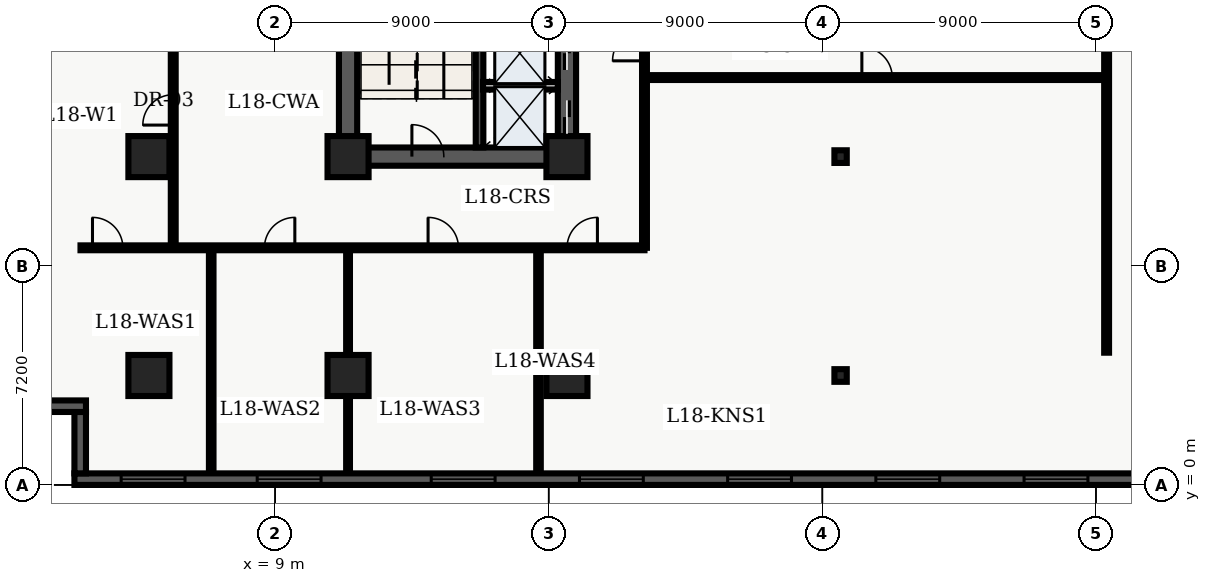
"""IFC4 building model, lengths in metres.
Left out: names, types, materials, properties, quantities, classifications, styles, units other than length and angle.
Written with IfcOpenShell. Run it as: python <this file> out.ifc"""

import sys

from ifc_helpers import new_model, entity, si_unit, converted_unit, direction, frame, origin_with_axes, origin_2d_with_axis, place, context, subcontext, project, spatial, polyline, rectangle, i_section, outline, extrude, element, fill, save


model = new_model("IFC4")
c1 = context("Model", 3, precision=1e-05, world=origin_with_axes(), true_north=direction((0.0, 1.0)))
c2 = subcontext(c1, "Body", "Model", "MODEL_VIEW")
j1 = project(units=[si_unit("LENGTHUNIT", "METRE"), converted_unit("PLANEANGLEUNIT", "DEGREE", entity("IfcPlaneAngleMeasure", 0.017), si_unit("PLANEANGLEUNIT", "RADIAN"), dimensions=[0, 0, 0, 0, 0, 0, 0])], contexts=[c1])
p1 = place(None, origin_with_axes())
s1 = spatial("IfcSite", under=j1, at=p1, CompositionType="ELEMENT")
p2 = place(p1, origin_with_axes())
s2 = spatial("IfcBuilding", under=s1, at=p2, CompositionType="ELEMENT")
p3 = place(p2, frame((0.0, 0.0, 75.6), z_axis=(0.0, 0.0, 1.0), x_axis=(1.0, 0.0, 0.0)))
s3 = spatial("IfcBuildingStorey", under=s2, at=p3, CompositionType="ELEMENT", Elevation=75.6)
p4 = place(p3, frame((11.4, 10.8, 0.0), z_axis=(0.0, 0.0, 1.0), x_axis=(0.0, 1.0, 0.0)))
e1 = element("IfcWall", 1, at=p4, inside=s3, PredefinedType="SHEAR", context=c2, shape_type="SweptSolid", body=[
    extrude(outline(polyline([(0.0, -0.3), (27.0, -0.3), (27.0, 0.3), (0.0, 0.3), (0.0, -0.3)])), origin_with_axes(), (0.0, 0.0, 1.0), 3.6),
])
p5 = place(p3, frame((11.4, 10.8, 0.0), z_axis=(0.0, 0.0, 1.0), x_axis=(1.0, 0.0, 0.0)))
e2 = element("IfcWall", 2, at=p5, inside=s3, PredefinedType="SHEAR", context=c2, shape_type="SweptSolid", body=[
    extrude(outline(polyline([(0.0, -0.3), (7.2, -0.3), (7.2, 0.3), (0.0, 0.3), (0.0, -0.3)])), origin_with_axes(), (0.0, 0.0, 1.0), 3.6),
])
p6 = place(p5, frame((2.625, 0.0, 0.0), z_axis=(0.0, 0.0, 1.0), x_axis=(1.0, 0.0, 0.0)))
e3 = element("IfcOpeningElement", 3, at=p6, cuts=e2, PredefinedType="OPENING", context=c2, shape_type="SweptSolid", body=[
    extrude(rectangle(XDim=1.05, YDim=0.62, at=origin_2d_with_axis()), origin_with_axes(), (0.0, 0.0, 1.0), 2.15),
])
p7 = place(p3, frame((18.6, 10.8, 0.0), z_axis=(0.0, 0.0, 1.0), x_axis=(0.0, 1.0, 0.0)))
e4 = element("IfcWall", 4, at=p7, inside=s3, PredefinedType="SHEAR", context=c2, shape_type="SweptSolid", body=[
    extrude(outline(polyline([(0.0, -0.3), (13.5, -0.3), (13.5, 0.3), (0.0, 0.3), (0.0, -0.3)])), origin_with_axes(), (0.0, 0.0, 1.0), 3.6),
])
p8 = place(p7, frame((1.3, 0.0, 0.0), z_axis=(0.0, 0.0, 1.0), x_axis=(1.0, 0.0, 0.0)))
e5 = element("IfcOpeningElement", 5, at=p8, cuts=e4, PredefinedType="OPENING", context=c2, shape_type="SweptSolid", body=[
    extrude(rectangle(XDim=1.1, YDim=0.62, at=origin_2d_with_axis()), origin_with_axes(), (0.0, 0.0, 1.0), 2.15),
])
p9 = place(p7, frame((3.4, 0.0, 0.0), z_axis=(0.0, 0.0, 1.0), x_axis=(1.0, 0.0, 0.0)))
e6 = element("IfcOpeningElement", 6, at=p9, cuts=e4, PredefinedType="OPENING", context=c2, shape_type="SweptSolid", body=[
    extrude(rectangle(XDim=1.1, YDim=0.62, at=origin_2d_with_axis()), origin_with_axes(), (0.0, 0.0, 1.0), 2.15),
])
p10 = place(p7, frame((11.125, 0.0, 0.0), z_axis=(0.0, 0.0, 1.0), x_axis=(1.0, 0.0, 0.0)))
e7 = element("IfcOpeningElement", 7, at=p10, cuts=e4, PredefinedType="OPENING", context=c2, shape_type="SweptSolid", body=[
    extrude(rectangle(XDim=1.05, YDim=0.62, at=origin_2d_with_axis()), origin_with_axes(), (0.0, 0.0, 1.0), 2.15),
])
p11 = place(p3, frame((15.725, 11.1, 0.0), z_axis=(0.0, 0.0, 1.0), x_axis=(0.0, 1.0, 0.0)))
e8 = element("IfcWall", 8, at=p11, inside=s3, PredefinedType="SHEAR", context=c2, shape_type="SweptSolid", body=[
    extrude(outline(polyline([(0.0, -0.125), (8.6, -0.125), (8.6, 0.125), (0.0, 0.125), (0.0, -0.125)])), origin_with_axes(), (0.0, 0.0, 1.0), 3.6),
])
for number, where, z_axis, x_axis in (
    (9, (11.4, 3.6, 0.0), (0.0, 0.0, 1.0), (1.0, 0.0, 0.0)),
    (10, (11.4, 10.8, 0.0), (0.0, 0.0, 1.0), (1.0, 0.0, 0.0)),
    (11, (18.6, 3.6, 0.0), (0.0, 0.0, 1.0), (1.0, 0.0, 0.0)),
    (12, (18.6, 10.8, 0.0), (0.0, 0.0, 1.0), (1.0, 0.0, 0.0)),
    (13, (4.85, 3.6, 0.0), (0.0, 0.0, 1.0), (1.0, 0.0, 0.0)),
    (14, (4.85, 10.8, 0.0), (0.0, 0.0, 1.0), (1.0, 0.0, 0.0)),
):
    element("IfcColumn", number, at=place(p3, frame(where, z_axis=z_axis, x_axis=x_axis)), inside=s3, PredefinedType="COLUMN", context=c2, shape_type="SweptSolid", body=[
        extrude(rectangle(XDim=1.35, YDim=1.35, at=origin_2d_with_axis()), origin_with_axes(), (0.0, 0.0, 1.0), 3.9),
    ])
for number, where, z_axis, x_axis in (
    (15, (27.6, 3.6, 0.0), (0.0, 0.0, 1.0), (1.0, 0.0, 0.0)),
    (16, (27.6, 10.8, 0.0), (0.0, 0.0, 1.0), (1.0, 0.0, 0.0)),
):
    element("IfcColumn", number, at=place(p3, frame(where, z_axis=z_axis, x_axis=x_axis)), inside=s3, PredefinedType="COLUMN", context=c2, shape_type="SweptSolid", body=[
        extrude(i_section(OverallWidth=0.406, OverallDepth=0.416, WebThickness=0.03, FlangeThickness=0.048, FilletRadius=0.022, at=origin_2d_with_axis()), origin_with_axes(), (0.0, 0.0, 1.0), 3.9),
    ])
p12 = place(p3, frame((15.84, 13.13, 0.0), z_axis=(0.0, 0.0, 1.0), x_axis=(1.0, 0.0, 0.0)))
e17 = element("IfcWall", 17, at=p12, inside=s3, PredefinedType="SOLIDWALL", context=c2, shape_type="SweptSolid", body=[
    extrude(outline(polyline([(0.0, -0.125), (2.46, -0.125), (2.46, 0.125), (0.0, 0.125), (0.0, -0.125)])), origin_with_axes(), (0.0, 0.0, 1.0), 2.64),
])
p13 = place(p3, frame((2.6, 7.8, 0.0), z_axis=(0.0, 0.0, 1.0), x_axis=(1.0, 0.0, 0.0)))
e18 = element("IfcWall", 18, at=p13, inside=s3, PredefinedType="PARTITIONING", context=c2, shape_type="SweptSolid", body=[
    extrude(outline(polyline([(0.0, -0.08), (18.55, -0.08), (18.55, 0.08), (0.0, 0.08), (0.0, -0.08)])), origin_with_axes(), (0.0, 0.0, 1.0), 2.64),
])
p14 = place(p13, frame((0.894, 0.0, 0.0), z_axis=(0.0, 0.0, 1.0), x_axis=(1.0, 0.0, 0.0)))
e19 = element("IfcOpeningElement", 19, at=p14, cuts=e18, PredefinedType="OPENING", context=c2, shape_type="SweptSolid", body=[
    extrude(rectangle(XDim=1.0, YDim=0.18, at=origin_2d_with_axis()), origin_with_axes(), (0.0, 0.0, 1.0), 2.15),
])
p15 = place(p13, frame((6.55, 0.0, 0.0), z_axis=(0.0, 0.0, 1.0), x_axis=(1.0, 0.0, 0.0)))
e20 = element("IfcOpeningElement", 20, at=p15, cuts=e18, PredefinedType="OPENING", context=c2, shape_type="SweptSolid", body=[
    extrude(rectangle(XDim=1.0, YDim=0.18, at=origin_2d_with_axis()), origin_with_axes(), (0.0, 0.0, 1.0), 2.15),
])
p16 = place(p13, frame((11.932, 0.0, 0.0), z_axis=(0.0, 0.0, 1.0), x_axis=(1.0, 0.0, 0.0)))
e21 = element("IfcOpeningElement", 21, at=p16, cuts=e18, PredefinedType="OPENING", context=c2, shape_type="SweptSolid", body=[
    extrude(rectangle(XDim=1.0, YDim=0.18, at=origin_2d_with_axis()), origin_with_axes(), (0.0, 0.0, 1.0), 2.15),
])
p17 = place(p13, frame((16.502, 0.0, 0.0), z_axis=(0.0, 0.0, 1.0), x_axis=(1.0, 0.0, 0.0)))
e22 = element("IfcOpeningElement", 22, at=p17, cuts=e18, PredefinedType="OPENING", context=c2, shape_type="SweptSolid", body=[
    extrude(rectangle(XDim=1.0, YDim=0.18, at=origin_2d_with_axis()), origin_with_axes(), (0.0, 0.0, 1.0), 2.15),
])
p18 = place(p3, frame((21.15, 7.8, 0.0), z_axis=(0.0, 0.0, 1.0), x_axis=(0.0, 1.0, 0.0)))
e23 = element("IfcWall", 23, at=p18, inside=s3, PredefinedType="PARTITIONING", context=c2, shape_type="SweptSolid", body=[
    extrude(outline(polyline([(0.0, -0.08), (32.7, -0.08), (32.7, 0.08), (0.0, 0.08), (0.0, -0.08)])), origin_with_axes(), (0.0, 0.0, 1.0), 2.64),
])
p19 = place(p18, frame((6.675, 0.0, 0.0), z_axis=(0.0, 0.0, 1.0), x_axis=(1.0, 0.0, 0.0)))
e24 = element("IfcOpeningElement", 24, at=p19, cuts=e23, PredefinedType="OPENING", context=c2, shape_type="SweptSolid", body=[
    extrude(rectangle(XDim=1.05, YDim=0.18, at=origin_2d_with_axis()), origin_with_axes(), (0.0, 0.0, 1.0), 2.15),
])
p20 = place(p3, frame((5.65, 7.8, 0.0), z_axis=(0.0, 0.0, 1.0), x_axis=(0.0, 1.0, 0.0)))
e25 = element("IfcWall", 25, at=p20, inside=s3, PredefinedType="PARTITIONING", context=c2, shape_type="SweptSolid", body=[
    extrude(outline(polyline([(0.0, -0.08), (32.7, -0.08), (32.7, 0.08), (0.0, 0.08), (0.0, -0.08)])), origin_with_axes(), (0.0, 0.0, 1.0), 2.64),
])
p21 = place(p20, frame((4.537, 0.0, 0.0), z_axis=(0.0, 0.0, 1.0), x_axis=(1.0, 0.0, 0.0)))
e26 = element("IfcOpeningElement", 26, at=p21, cuts=e25, PredefinedType="OPENING", context=c2, shape_type="SweptSolid", body=[
    extrude(rectangle(XDim=1.0, YDim=0.18, at=origin_2d_with_axis()), origin_with_axes(), (0.0, 0.0, 1.0), 2.15),
])
p22 = place(p20, frame((13.551, 0.0, 0.0), z_axis=(0.0, 0.0, 1.0), x_axis=(1.0, 0.0, 0.0)))
e27 = element("IfcOpeningElement", 27, at=p22, cuts=e25, PredefinedType="OPENING", context=c2, shape_type="SweptSolid", body=[
    extrude(rectangle(XDim=1.0, YDim=0.18, at=origin_2d_with_axis()), origin_with_axes(), (0.0, 0.0, 1.0), 2.15),
])
p23 = place(p20, frame((25.643, 0.0, 0.0), z_axis=(0.0, 0.0, 1.0), x_axis=(1.0, 0.0, 0.0)))
e28 = element("IfcOpeningElement", 28, at=p23, cuts=e25, PredefinedType="OPENING", context=c2, shape_type="SweptSolid", body=[
    extrude(rectangle(XDim=1.0, YDim=0.18, at=origin_2d_with_axis()), origin_with_axes(), (0.0, 0.0, 1.0), 2.15),
])
p24 = place(p3, frame((6.899, 0.36, 0.0), z_axis=(0.0, 0.0, 1.0), x_axis=(0.0, 1.0, 0.0)))
e29 = element("IfcWall", 29, at=p24, inside=s3, PredefinedType="PARTITIONING", context=c2, shape_type="SweptSolid", body=[
    extrude(outline(polyline([(0.0, -0.075), (7.34, -0.075), (7.34, 0.075), (0.0, 0.075), (0.0, -0.075)])), origin_with_axes(), (0.0, 0.0, 1.0), 2.64),
])
p25 = place(p3, frame((11.4, 0.36, 0.0), z_axis=(0.0, 0.0, 1.0), x_axis=(0.0, 1.0, 0.0)))
e30 = element("IfcWall", 30, at=p25, inside=s3, PredefinedType="PARTITIONING", context=c2, shape_type="SweptSolid", body=[
    extrude(outline(polyline([(0.0, -0.062), (7.34, -0.062), (7.34, 0.062), (0.0, 0.062), (0.0, -0.062)])), origin_with_axes(), (0.0, 0.0, 1.0), 2.64),
])
p26 = place(p3, frame((17.664, 0.36, 0.0), z_axis=(0.0, 0.0, 1.0), x_axis=(0.0, 1.0, 0.0)))
e31 = element("IfcWall", 31, at=p26, inside=s3, PredefinedType="PARTITIONING", context=c2, shape_type="SweptSolid", body=[
    extrude(outline(polyline([(0.0, -0.075), (7.34, -0.075), (7.34, 0.075), (0.0, 0.075), (0.0, -0.075)])), origin_with_axes(), (0.0, 0.0, 1.0), 2.64),
])
p27 = place(p3, frame((21.15, 13.4, 0.0), z_axis=(0.0, 0.0, 1.0), x_axis=(1.0, 0.0, 0.0)))
e32 = element("IfcWall", 32, at=p27, inside=s3, PredefinedType="PARTITIONING", context=c2, shape_type="SweptSolid", body=[
    extrude(outline(polyline([(0.0, -0.08), (15.2, -0.08), (15.2, 0.08), (0.0, 0.08), (0.0, -0.08)])), origin_with_axes(), (0.0, 0.0, 1.0), 2.64),
])
p28 = place(p27, frame((7.65, 0.0, 0.0), z_axis=(0.0, 0.0, 1.0), x_axis=(1.0, 0.0, 0.0)))
e33 = element("IfcOpeningElement", 33, at=p28, cuts=e32, PredefinedType="OPENING", context=c2, shape_type="SweptSolid", body=[
    extrude(rectangle(XDim=1.0, YDim=0.18, at=origin_2d_with_axis()), origin_with_axes(), (0.0, 0.0, 1.0), 2.15),
])
p29 = place(p3, frame((36.35, 4.35, 0.0), z_axis=(0.0, 0.0, 1.0), x_axis=(0.0, 1.0, 0.0)))
e34 = element("IfcWall", 34, at=p29, inside=s3, PredefinedType="PARTITIONING", context=c2, shape_type="SweptSolid", body=[
    extrude(outline(polyline([(0.0, -0.08), (16.95, -0.08), (16.95, 0.08), (0.0, 0.08), (0.0, -0.08)])), origin_with_axes(), (0.0, 0.0, 1.0), 2.64),
])
p30 = place(p3, frame((57.22, 0.19, 0.0), z_axis=(0.0, 0.0, 1.0), x_axis=(-1.0, 0.0, 0.0)))
e35 = element("IfcWall", 35, at=p30, inside=s3, PredefinedType="SOLIDWALL", context=c2, shape_type="SweptSolid", body=[
    extrude(outline(polyline([(0.0, -0.19), (54.82, -0.19), (54.82, 0.19), (0.0, 0.19), (0.0, -0.19)])), origin_with_axes(), (0.0, 0.0, 1.0), 3.6),
])
p31 = place(p30, frame((3.037, 0.0, 0.45), z_axis=(0.0, 0.0, 1.0), x_axis=(1.0, 0.0, 0.0)))
e36 = element("IfcOpeningElement", 36, at=p31, cuts=e35, PredefinedType="OPENING", context=c2, shape_type="SweptSolid", body=[
    extrude(rectangle(XDim=2.1, YDim=0.4, at=origin_2d_with_axis()), origin_with_axes(), (0.0, 0.0, 1.0), 2.2),
])
p32 = place(p30, frame((7.912, 0.0, 0.45), z_axis=(0.0, 0.0, 1.0), x_axis=(1.0, 0.0, 0.0)))
e37 = element("IfcOpeningElement", 37, at=p32, cuts=e35, PredefinedType="OPENING", context=c2, shape_type="SweptSolid", body=[
    extrude(rectangle(XDim=2.1, YDim=0.4, at=origin_2d_with_axis()), origin_with_axes(), (0.0, 0.0, 1.0), 2.2),
])
p33 = place(p30, frame((12.786, 0.0, 0.45), z_axis=(0.0, 0.0, 1.0), x_axis=(1.0, 0.0, 0.0)))
e38 = element("IfcOpeningElement", 38, at=p33, cuts=e35, PredefinedType="OPENING", context=c2, shape_type="SweptSolid", body=[
    extrude(rectangle(XDim=2.1, YDim=0.4, at=origin_2d_with_axis()), origin_with_axes(), (0.0, 0.0, 1.0), 2.2),
])
p34 = place(p30, frame((17.661, 0.0, 0.45), z_axis=(0.0, 0.0, 1.0), x_axis=(1.0, 0.0, 0.0)))
e39 = element("IfcOpeningElement", 39, at=p34, cuts=e35, PredefinedType="OPENING", context=c2, shape_type="SweptSolid", body=[
    extrude(rectangle(XDim=2.1, YDim=0.4, at=origin_2d_with_axis()), origin_with_axes(), (0.0, 0.0, 1.0), 2.2),
])
p35 = place(p30, frame((22.535, 0.0, 0.45), z_axis=(0.0, 0.0, 1.0), x_axis=(1.0, 0.0, 0.0)))
e40 = element("IfcOpeningElement", 40, at=p35, cuts=e35, PredefinedType="OPENING", context=c2, shape_type="SweptSolid", body=[
    extrude(rectangle(XDim=2.1, YDim=0.4, at=origin_2d_with_axis()), origin_with_axes(), (0.0, 0.0, 1.0), 2.2),
])
p36 = place(p30, frame((27.41, 0.0, 0.45), z_axis=(0.0, 0.0, 1.0), x_axis=(1.0, 0.0, 0.0)))
e41 = element("IfcOpeningElement", 41, at=p36, cuts=e35, PredefinedType="OPENING", context=c2, shape_type="SweptSolid", body=[
    extrude(rectangle(XDim=2.1, YDim=0.4, at=origin_2d_with_axis()), origin_with_axes(), (0.0, 0.0, 1.0), 2.2),
])
p37 = place(p30, frame((32.285, 0.0, 0.45), z_axis=(0.0, 0.0, 1.0), x_axis=(1.0, 0.0, 0.0)))
e42 = element("IfcOpeningElement", 42, at=p37, cuts=e35, PredefinedType="OPENING", context=c2, shape_type="SweptSolid", body=[
    extrude(rectangle(XDim=2.1, YDim=0.4, at=origin_2d_with_axis()), origin_with_axes(), (0.0, 0.0, 1.0), 2.2),
])
p38 = place(p30, frame((37.159, 0.0, 0.45), z_axis=(0.0, 0.0, 1.0), x_axis=(1.0, 0.0, 0.0)))
e43 = element("IfcOpeningElement", 43, at=p38, cuts=e35, PredefinedType="OPENING", context=c2, shape_type="SweptSolid", body=[
    extrude(rectangle(XDim=2.1, YDim=0.4, at=origin_2d_with_axis()), origin_with_axes(), (0.0, 0.0, 1.0), 2.2),
])
p39 = place(p30, frame((42.034, 0.0, 0.45), z_axis=(0.0, 0.0, 1.0), x_axis=(1.0, 0.0, 0.0)))
e44 = element("IfcOpeningElement", 44, at=p39, cuts=e35, PredefinedType="OPENING", context=c2, shape_type="SweptSolid", body=[
    extrude(rectangle(XDim=2.1, YDim=0.4, at=origin_2d_with_axis()), origin_with_axes(), (0.0, 0.0, 1.0), 2.2),
])
p40 = place(p30, frame((47.758, 0.0, 0.45), z_axis=(0.0, 0.0, 1.0), x_axis=(1.0, 0.0, 0.0)))
e45 = element("IfcOpeningElement", 45, at=p40, cuts=e35, PredefinedType="OPENING", context=c2, shape_type="SweptSolid", body=[
    extrude(rectangle(XDim=2.1, YDim=0.4, at=origin_2d_with_axis()), origin_with_axes(), (0.0, 0.0, 1.0), 2.2),
])
p41 = place(p30, frame((52.233, 0.0, 0.45), z_axis=(0.0, 0.0, 1.0), x_axis=(1.0, 0.0, 0.0)))
e46 = element("IfcOpeningElement", 46, at=p41, cuts=e35, PredefinedType="OPENING", context=c2, shape_type="SweptSolid", body=[
    extrude(rectangle(XDim=2.1, YDim=0.4, at=origin_2d_with_axis()), origin_with_axes(), (0.0, 0.0, 1.0), 2.2),
])
p42 = place(p3, frame((2.59, 0.38, 0.0), z_axis=(0.0, 0.0, 1.0), x_axis=(0.0, 1.0, 0.0)))
e47 = element("IfcWall", 47, at=p42, inside=s3, PredefinedType="SOLIDWALL", context=c2, shape_type="SweptSolid", body=[
    extrude(outline(polyline([(0.0, -0.19), (2.02, -0.19), (2.02, 0.19), (0.0, 0.19), (0.0, -0.19)])), origin_with_axes(), (0.0, 0.0, 1.0), 3.6),
])
p43 = place(p3, frame((2.78, 2.59, 0.0), z_axis=(0.0, 0.0, 1.0), x_axis=(-1.0, 0.0, 0.0)))
e48 = element("IfcWall", 48, at=p43, inside=s3, PredefinedType="SOLIDWALL", context=c2, shape_type="SweptSolid", body=[
    extrude(outline(polyline([(0.0, -0.19), (2.78, -0.19), (2.78, 0.19), (0.0, 0.19), (0.0, -0.19)])), origin_with_axes(), (0.0, 0.0, 1.0), 3.6),
])
p44 = place(p7, frame((1.3, 0.0, 0.0), z_axis=(0.0, 0.0, 1.0), x_axis=(1.0, 0.0, 0.0)))
e49 = element("IfcDoor", 49, at=p44, inside=s3, OperationType="SLIDING_TO_LEFT", PredefinedType="DOOR", context=c2, shape_type="SweptSolid", body=[
    extrude(rectangle(XDim=1.1, YDim=0.09, at=origin_2d_with_axis()), origin_with_axes(), (0.0, 0.0, 1.0), 2.15),
])
fill(e5, e49)
p45 = place(p7, frame((3.4, 0.0, 0.0), z_axis=(0.0, 0.0, 1.0), x_axis=(1.0, 0.0, 0.0)))
e50 = element("IfcDoor", 50, at=p45, inside=s3, OperationType="SLIDING_TO_RIGHT", PredefinedType="DOOR", context=c2, shape_type="SweptSolid", body=[
    extrude(rectangle(XDim=1.1, YDim=0.09, at=origin_2d_with_axis()), origin_with_axes(), (0.0, 0.0, 1.0), 2.15),
])
fill(e6, e50)
p46 = place(p5, frame((2.625, 0.0, 0.0), z_axis=(0.0, 0.0, 1.0), x_axis=(1.0, 0.0, 0.0)))
e51 = element("IfcDoor", 51, at=p46, inside=s3, OperationType="SINGLE_SWING_LEFT", PredefinedType="DOOR", context=c2, shape_type="SweptSolid", body=[
    extrude(rectangle(XDim=1.05, YDim=0.09, at=origin_2d_with_axis()), origin_with_axes(), (0.0, 0.0, 1.0), 2.15),
])
fill(e3, e51)
p47 = place(p20, frame((4.537, 0.0, 0.0), z_axis=(0.0, 0.0, 1.0), x_axis=(1.0, 0.0, 0.0)))
e52 = element("IfcDoor", 52, at=p47, inside=s3, OperationType="SINGLE_SWING_LEFT", PredefinedType="DOOR", context=c2, shape_type="SweptSolid", body=[
    extrude(rectangle(XDim=1.0, YDim=0.09, at=origin_2d_with_axis()), origin_with_axes(), (0.0, 0.0, 1.0), 2.15),
])
fill(e26, e52)
p48 = place(p13, frame((0.894, 0.0, 0.0), z_axis=(0.0, 0.0, 1.0), x_axis=(1.0, 0.0, 0.0)))
e53 = element("IfcDoor", 53, at=p48, inside=s3, OperationType="SINGLE_SWING_LEFT", PredefinedType="DOOR", context=c2, shape_type="SweptSolid", body=[
    extrude(rectangle(XDim=1.0, YDim=0.09, at=origin_2d_with_axis()), origin_with_axes(), (0.0, 0.0, 1.0), 2.15),
])
fill(e19, e53)
p49 = place(p13, frame((6.55, 0.0, 0.0), z_axis=(0.0, 0.0, 1.0), x_axis=(1.0, 0.0, 0.0)))
e54 = element("IfcDoor", 54, at=p49, inside=s3, OperationType="SINGLE_SWING_RIGHT", PredefinedType="DOOR", context=c2, shape_type="SweptSolid", body=[
    extrude(rectangle(XDim=1.0, YDim=0.09, at=origin_2d_with_axis()), origin_with_axes(), (0.0, 0.0, 1.0), 2.15),
])
fill(e20, e54)
p50 = place(p13, frame((11.932, 0.0, 0.0), z_axis=(0.0, 0.0, 1.0), x_axis=(1.0, 0.0, 0.0)))
e55 = element("IfcDoor", 55, at=p50, inside=s3, OperationType="SINGLE_SWING_LEFT", PredefinedType="DOOR", context=c2, shape_type="SweptSolid", body=[
    extrude(rectangle(XDim=1.0, YDim=0.09, at=origin_2d_with_axis()), origin_with_axes(), (0.0, 0.0, 1.0), 2.15),
])
fill(e21, e55)
p51 = place(p13, frame((16.502, 0.0, 0.0), z_axis=(0.0, 0.0, 1.0), x_axis=(1.0, 0.0, 0.0)))
e56 = element("IfcDoor", 56, at=p51, inside=s3, OperationType="SINGLE_SWING_RIGHT", PredefinedType="DOOR", context=c2, shape_type="SweptSolid", body=[
    extrude(rectangle(XDim=1.0, YDim=0.09, at=origin_2d_with_axis()), origin_with_axes(), (0.0, 0.0, 1.0), 2.15),
])
fill(e22, e56)
p52 = place(p18, frame((6.675, 0.0, 0.0), z_axis=(0.0, 0.0, 1.0), x_axis=(1.0, 0.0, 0.0)))
e57 = element("IfcDoor", 57, at=p52, inside=s3, OperationType="SINGLE_SWING_LEFT", PredefinedType="DOOR", context=c2, shape_type="SweptSolid", body=[
    extrude(rectangle(XDim=1.05, YDim=0.09, at=origin_2d_with_axis()), origin_with_axes(), (0.0, 0.0, 1.0), 2.15),
])
fill(e24, e57)
p53 = place(p27, frame((7.65, 0.0, 0.0), z_axis=(0.0, 0.0, 1.0), x_axis=(1.0, 0.0, 0.0)))
e58 = element("IfcDoor", 58, at=p53, inside=s3, OperationType="SINGLE_SWING_LEFT", PredefinedType="DOOR", context=c2, shape_type="SweptSolid", body=[
    extrude(rectangle(XDim=1.0, YDim=0.09, at=origin_2d_with_axis()), origin_with_axes(), (0.0, 0.0, 1.0), 2.15),
])
fill(e33, e58)
p54 = place(p30, frame((22.535, 0.0, 0.45), z_axis=(0.0, 0.0, 1.0), x_axis=(1.0, 0.0, 0.0)))
e59 = element("IfcWindow", 59, at=p54, inside=s3, PredefinedType="WINDOW", context=c2, shape_type="SweptSolid", body=[
    extrude(rectangle(XDim=2.1, YDim=0.09, at=origin_2d_with_axis()), origin_with_axes(), (0.0, 0.0, 1.0), 2.2),
])
fill(e40, e59)
p55 = place(p30, frame((27.41, 0.0, 0.45), z_axis=(0.0, 0.0, 1.0), x_axis=(1.0, 0.0, 0.0)))
e60 = element("IfcWindow", 60, at=p55, inside=s3, PredefinedType="WINDOW", context=c2, shape_type="SweptSolid", body=[
    extrude(rectangle(XDim=2.1, YDim=0.09, at=origin_2d_with_axis()), origin_with_axes(), (0.0, 0.0, 1.0), 2.2),
])
fill(e41, e60)
p56 = place(p30, frame((32.285, 0.0, 0.45), z_axis=(0.0, 0.0, 1.0), x_axis=(1.0, 0.0, 0.0)))
e61 = element("IfcWindow", 61, at=p56, inside=s3, PredefinedType="WINDOW", context=c2, shape_type="SweptSolid", body=[
    extrude(rectangle(XDim=2.1, YDim=0.09, at=origin_2d_with_axis()), origin_with_axes(), (0.0, 0.0, 1.0), 2.2),
])
fill(e42, e61)
p57 = place(p30, frame((37.159, 0.0, 0.45), z_axis=(0.0, 0.0, 1.0), x_axis=(1.0, 0.0, 0.0)))
e62 = element("IfcWindow", 62, at=p57, inside=s3, PredefinedType="WINDOW", context=c2, shape_type="SweptSolid", body=[
    extrude(rectangle(XDim=2.1, YDim=0.09, at=origin_2d_with_axis()), origin_with_axes(), (0.0, 0.0, 1.0), 2.2),
])
fill(e43, e62)
p58 = place(p30, frame((42.034, 0.0, 0.45), z_axis=(0.0, 0.0, 1.0), x_axis=(1.0, 0.0, 0.0)))
e63 = element("IfcWindow", 63, at=p58, inside=s3, PredefinedType="WINDOW", context=c2, shape_type="SweptSolid", body=[
    extrude(rectangle(XDim=2.1, YDim=0.09, at=origin_2d_with_axis()), origin_with_axes(), (0.0, 0.0, 1.0), 2.2),
])
fill(e44, e63)
p59 = place(p30, frame((47.758, 0.0, 0.45), z_axis=(0.0, 0.0, 1.0), x_axis=(1.0, 0.0, 0.0)))
e64 = element("IfcWindow", 64, at=p59, inside=s3, PredefinedType="WINDOW", context=c2, shape_type="SweptSolid", body=[
    extrude(rectangle(XDim=2.1, YDim=0.09, at=origin_2d_with_axis()), origin_with_axes(), (0.0, 0.0, 1.0), 2.2),
])
fill(e45, e64)
p60 = place(p30, frame((52.233, 0.0, 0.45), z_axis=(0.0, 0.0, 1.0), x_axis=(1.0, 0.0, 0.0)))
e65 = element("IfcWindow", 65, at=p60, inside=s3, PredefinedType="WINDOW", context=c2, shape_type="SweptSolid", body=[
    extrude(rectangle(XDim=2.1, YDim=0.09, at=origin_2d_with_axis()), origin_with_axes(), (0.0, 0.0, 1.0), 2.2),
])
fill(e46, e65)
save(model, sys.argv[1])
